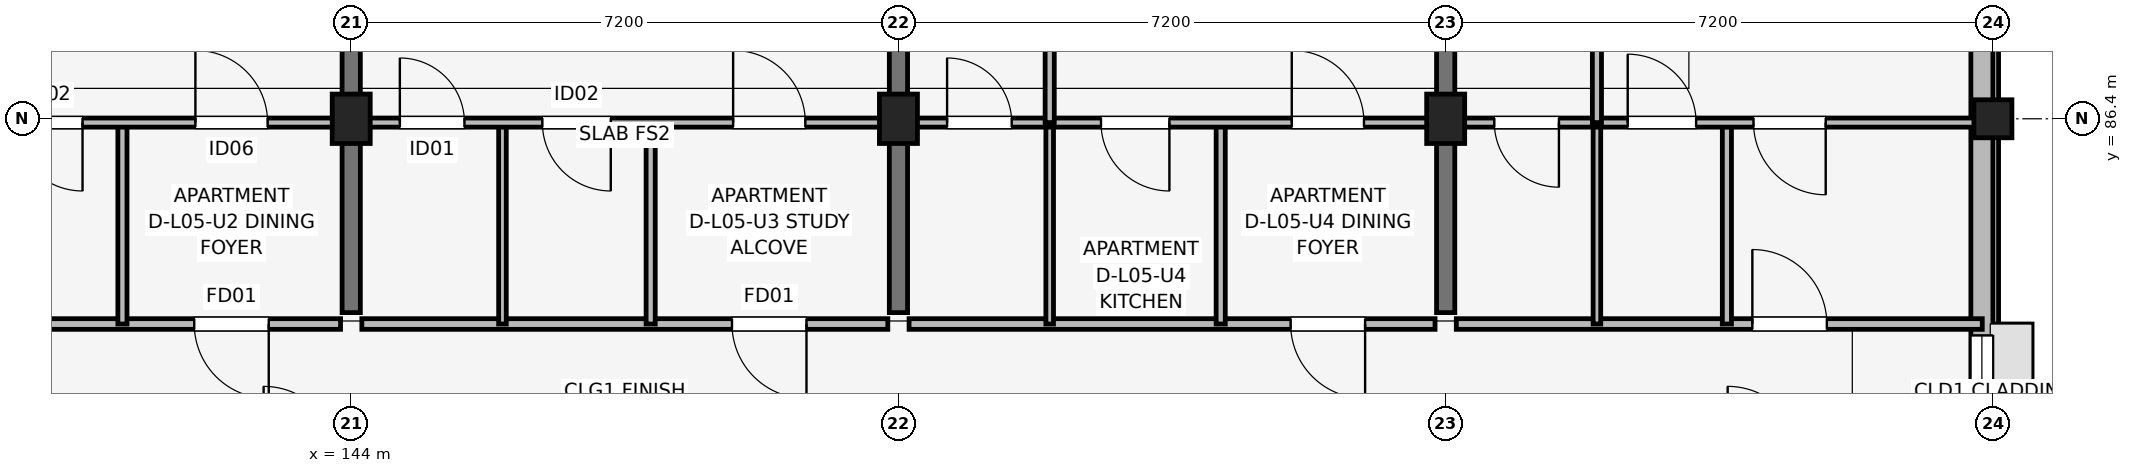
"""IFC4 building model, lengths in metres.
Left out: names, types, materials, properties, quantities, classifications, styles, units other than length and angle.
Written with IfcOpenShell. Run it as: python <this file> out.ifc"""

import sys

from ifc_helpers import new_model, si_unit, direction, frame, frame_2d, origin, origin_2d, place, context, subcontext, project, spatial, rectangle, extrude, element, fill, save


model = new_model("IFC4")
c1 = context("Model", 3, precision=1e-05, world=origin(), true_north=direction((0.0, 1.0)))
c2 = subcontext(c1, "Body", "Model", "MODEL_VIEW")
j1 = project(units=[si_unit("LENGTHUNIT", "METRE"), si_unit("PLANEANGLEUNIT", "RADIAN")], contexts=[c1])
p1 = place(None, origin())
s1 = spatial("IfcSite", under=j1, at=p1, CompositionType="ELEMENT")
p2 = place(p1, origin())
s2 = spatial("IfcBuilding", under=s1, at=p2, CompositionType="ELEMENT")
p3 = place(p2, frame((0.0, 0.0, 18.15)))
s3 = spatial("IfcBuildingStorey", under=s2, at=p3, CompositionType="ELEMENT", Elevation=18.15)
for number, where, z_axis, x_axis in (
    (1, (144.0, 86.4, 0.0), (0.0, 0.0, 1.0), (1.0, 0.0, 0.0)),
    (2, (151.2, 86.4, 0.0), (0.0, 0.0, 1.0), (1.0, 0.0, 0.0)),
    (3, (158.4, 86.4, 0.0), (0.0, 0.0, 1.0), (1.0, 0.0, 0.0)),
):
    element("IfcColumn", number, at=place(p3, frame(where, z_axis=z_axis, x_axis=x_axis)), inside=s3, PredefinedType="COLUMN", context=c2, shape_type="SweptSolid", body=[
        extrude(rectangle(XDim=0.5, YDim=0.65, at=origin_2d()), origin(), (0.0, 0.0, 1.0), 3.15),
    ])
p4 = place(p3, frame((165.6, 86.4, 0.0), z_axis=(0.0, 0.0, 1.0), x_axis=(1.0, 0.0, 0.0)))
e4 = element("IfcColumn", 4, at=p4, inside=s3, PredefinedType="COLUMN", context=c2, shape_type="SweptSolid", body=[
    extrude(rectangle(XDim=0.5, YDim=0.5, at=origin_2d()), origin(), (0.0, 0.0, 1.0), 3.15),
])
for number, where, z_axis, x_axis in (
    (5, (144.0, 83.85, 0.0), (0.0, 0.0, 1.0), (0.0, 1.0, 0.0)),
    (6, (151.2, 83.85, 0.0), (0.0, 0.0, 1.0), (0.0, 1.0, 0.0)),
    (7, (158.4, 83.85, 0.0), (0.0, 0.0, 1.0), (0.0, 1.0, 0.0)),
):
    element("IfcWall", number, at=place(p3, frame(where, z_axis=z_axis, x_axis=x_axis)), inside=s3, PredefinedType="SHEAR", context=c2, shape_type="SweptSolid", body=[
        extrude(rectangle(XDim=9.4, YDim=0.24, at=frame_2d((4.7, 0.0))), origin(), (0.0, 0.0, 1.0), 3.15),
    ])
p5 = place(p3, frame((165.455, 74.8, 0.0), z_axis=(0.0, 0.0, 1.0), x_axis=(0.0, 1.0, 0.0)))
e8 = element("IfcWall", 8, at=p5, inside=s3, PredefinedType="SOLIDWALL", context=c2, shape_type="SweptSolid", body=[
    extrude(rectangle(XDim=16.0, YDim=0.29, at=frame_2d((8.0, 0.0))), origin(), (0.0, 0.0, 1.0), 2.38),
])
p6 = place(p5, frame((7.25, 0.0, 1.05)))
e9 = element("IfcOpeningElement", 9, at=p6, cuts=e8, PredefinedType="OPENING", context=c2, shape_type="SweptSolid", body=[
    extrude(rectangle(XDim=1.5, YDim=1.15, at=frame_2d((0.75, 0.575))), frame((0.0, 0.155, 0.0), z_axis=(0.0, -1.0, 0.0), x_axis=(1.0, 0.0, 0.0)), (0.0, 0.0, 1.0), 0.31),
])
p7 = place(p5, frame((13.13, 0.0, 0.67)))
e10 = element("IfcOpeningElement", 10, at=p7, cuts=e8, PredefinedType="OPENING", context=c2, shape_type="SweptSolid", body=[
    extrude(rectangle(XDim=1.42, YDim=1.6, at=frame_2d((0.71, 0.8))), frame((0.0, 0.155, 0.0), z_axis=(0.0, -1.0, 0.0), x_axis=(1.0, 0.0, 0.0)), (0.0, 0.0, 1.0), 0.31),
])
p8 = place(p3, frame((136.94, 83.7, 0.0), z_axis=(0.0, 0.0, 1.0), x_axis=(1.0, 0.0, 0.0)))
e11 = element("IfcWall", 11, at=p8, inside=s3, PredefinedType="PARTITIONING", context=c2, shape_type="SweptSolid", body=[
    extrude(rectangle(XDim=6.92, YDim=0.14, at=frame_2d((3.46, 0.0))), origin(), (0.0, 0.0, 1.0), 2.38),
])
p9 = place(p8, frame((5.975, 0.0, 0.0), z_axis=(0.0, 0.0, 1.0), x_axis=(-1.0, 0.0, 0.0)))
e12 = element("IfcOpeningElement", 12, at=p9, cuts=e11, PredefinedType="OPENING", context=c2, shape_type="SweptSolid", body=[
    extrude(rectangle(XDim=0.98, YDim=2.1, at=frame_2d((0.49, 1.05))), frame((0.0, 0.08, 0.0), z_axis=(0.0, -1.0, 0.0), x_axis=(1.0, 0.0, 0.0)), (0.0, 0.0, 1.0), 0.16),
])
p10 = place(p3, frame((140.99, 83.7, 0.0), z_axis=(0.0, 0.0, 1.0), x_axis=(0.0, 1.0, 0.0)))
e13 = element("IfcWall", 13, at=p10, inside=s3, PredefinedType="PARTITIONING", context=c2, shape_type="SweptSolid", body=[
    extrude(rectangle(XDim=2.65, YDim=0.12, at=frame_2d((1.325, 0.0))), origin(), (0.0, 0.0, 1.0), 2.375),
])
p11 = place(p3, frame((136.94, 86.35, 0.0), z_axis=(0.0, 0.0, 1.0), x_axis=(1.0, 0.0, 0.0)))
e14 = element("IfcWall", 14, at=p11, inside=s3, PredefinedType="PARTITIONING", context=c2, shape_type="SweptSolid", body=[
    extrude(rectangle(XDim=6.92, YDim=0.12, at=frame_2d((3.46, 0.0))), origin(), (0.0, 0.0, 1.0), 2.375),
])
p12 = place(p11, frame((0.625, 0.0, 0.0)))
e15 = element("IfcOpeningElement", 15, at=p12, cuts=e14, PredefinedType="OPENING", context=c2, shape_type="SweptSolid", body=[
    extrude(rectangle(XDim=0.85, YDim=2.08, at=frame_2d((0.425, 1.04))), frame((0.0, 0.07, 0.0), z_axis=(0.0, -1.0, 0.0), x_axis=(1.0, 0.0, 0.0)), (0.0, 0.0, 1.0), 0.14),
])
p13 = place(p11, frame((3.525, 0.0, 0.0), z_axis=(0.0, 0.0, 1.0), x_axis=(-1.0, 0.0, 0.0)))
e16 = element("IfcOpeningElement", 16, at=p13, cuts=e14, PredefinedType="OPENING", context=c2, shape_type="SweptSolid", body=[
    extrude(rectangle(XDim=0.9, YDim=2.08, at=frame_2d((0.45, 1.04))), frame((0.0, 0.07, 0.0), z_axis=(0.0, -1.0, 0.0), x_axis=(1.0, 0.0, 0.0)), (0.0, 0.0, 1.0), 0.14),
])
p14 = place(p11, frame((5.01, 0.0, 0.0)))
e17 = element("IfcOpeningElement", 17, at=p14, cuts=e14, PredefinedType="OPENING", context=c2, shape_type="SweptSolid", body=[
    extrude(rectangle(XDim=0.95, YDim=2.08, at=frame_2d((0.475, 1.04))), frame((0.0, 0.07, 0.0), z_axis=(0.0, -1.0, 0.0), x_axis=(1.0, 0.0, 0.0)), (0.0, 0.0, 1.0), 0.14),
])
p15 = place(p3, frame((144.14, 83.7, 0.0), z_axis=(0.0, 0.0, 1.0), x_axis=(1.0, 0.0, 0.0)))
e18 = element("IfcWall", 18, at=p15, inside=s3, PredefinedType="PARTITIONING", context=c2, shape_type="SweptSolid", body=[
    extrude(rectangle(XDim=6.92, YDim=0.14, at=frame_2d((3.46, 0.0))), origin(), (0.0, 0.0, 1.0), 2.38),
])
p16 = place(p15, frame((5.85, 0.0, 0.0), z_axis=(0.0, 0.0, 1.0), x_axis=(-1.0, 0.0, 0.0)))
e19 = element("IfcOpeningElement", 19, at=p16, cuts=e18, PredefinedType="OPENING", context=c2, shape_type="SweptSolid", body=[
    extrude(rectangle(XDim=0.98, YDim=2.1, at=frame_2d((0.49, 1.05))), frame((0.0, 0.08, 0.0), z_axis=(0.0, -1.0, 0.0), x_axis=(1.0, 0.0, 0.0)), (0.0, 0.0, 1.0), 0.16),
])
p17 = place(p3, frame((145.99, 83.7, 0.0), z_axis=(0.0, 0.0, 1.0), x_axis=(0.0, 1.0, 0.0)))
e20 = element("IfcWall", 20, at=p17, inside=s3, PredefinedType="PARTITIONING", context=c2, shape_type="SweptSolid", body=[
    extrude(rectangle(XDim=2.65, YDim=0.1, at=frame_2d((1.325, 0.0))), origin(), (0.0, 0.0, 1.0), 2.375),
])
p18 = place(p3, frame((147.94, 83.7, 0.0), z_axis=(0.0, 0.0, 1.0), x_axis=(0.0, 1.0, 0.0)))
e21 = element("IfcWall", 21, at=p18, inside=s3, PredefinedType="PARTITIONING", context=c2, shape_type="SweptSolid", body=[
    extrude(rectangle(XDim=2.65, YDim=0.12, at=frame_2d((1.325, 0.0))), origin(), (0.0, 0.0, 1.0), 2.375),
])
p19 = place(p3, frame((144.14, 86.35, 0.0), z_axis=(0.0, 0.0, 1.0), x_axis=(1.0, 0.0, 0.0)))
e22 = element("IfcWall", 22, at=p19, inside=s3, PredefinedType="PARTITIONING", context=c2, shape_type="SweptSolid", body=[
    extrude(rectangle(XDim=6.92, YDim=0.12, at=frame_2d((3.46, 0.0))), origin(), (0.0, 0.0, 1.0), 2.375),
])
p20 = place(p19, frame((0.5, 0.0, 0.0)))
e23 = element("IfcOpeningElement", 23, at=p20, cuts=e22, PredefinedType="OPENING", context=c2, shape_type="SweptSolid", body=[
    extrude(rectangle(XDim=0.85, YDim=2.08, at=frame_2d((0.425, 1.04))), frame((0.0, 0.07, 0.0), z_axis=(0.0, -1.0, 0.0), x_axis=(1.0, 0.0, 0.0)), (0.0, 0.0, 1.0), 0.14),
])
p21 = place(p19, frame((3.275, 0.0, 0.0), z_axis=(0.0, 0.0, 1.0), x_axis=(-1.0, 0.0, 0.0)))
e24 = element("IfcOpeningElement", 24, at=p21, cuts=e22, PredefinedType="OPENING", context=c2, shape_type="SweptSolid", body=[
    extrude(rectangle(XDim=0.9, YDim=2.08, at=frame_2d((0.45, 1.04))), frame((0.0, 0.07, 0.0), z_axis=(0.0, -1.0, 0.0), x_axis=(1.0, 0.0, 0.0)), (0.0, 0.0, 1.0), 0.14),
])
p22 = place(p19, frame((4.885, 0.0, 0.0)))
e25 = element("IfcOpeningElement", 25, at=p22, cuts=e22, PredefinedType="OPENING", context=c2, shape_type="SweptSolid", body=[
    extrude(rectangle(XDim=0.95, YDim=2.08, at=frame_2d((0.475, 1.04))), frame((0.0, 0.07, 0.0), z_axis=(0.0, -1.0, 0.0), x_axis=(1.0, 0.0, 0.0)), (0.0, 0.0, 1.0), 0.14),
])
p23 = place(p3, frame((151.34, 83.7, 0.0), z_axis=(0.0, 0.0, 1.0), x_axis=(1.0, 0.0, 0.0)))
e26 = element("IfcWall", 26, at=p23, inside=s3, PredefinedType="PARTITIONING", context=c2, shape_type="SweptSolid", body=[
    extrude(rectangle(XDim=6.92, YDim=0.14, at=frame_2d((3.46, 0.0))), origin(), (0.0, 0.0, 1.0), 2.38),
])
p24 = place(p23, frame((6.0, 0.0, 0.0), z_axis=(0.0, 0.0, 1.0), x_axis=(-1.0, 0.0, 0.0)))
e27 = element("IfcOpeningElement", 27, at=p24, cuts=e26, PredefinedType="OPENING", context=c2, shape_type="SweptSolid", body=[
    extrude(rectangle(XDim=0.98, YDim=2.1, at=frame_2d((0.49, 1.05))), frame((0.0, 0.08, 0.0), z_axis=(0.0, -1.0, 0.0), x_axis=(1.0, 0.0, 0.0)), (0.0, 0.0, 1.0), 0.16),
])
p25 = place(p3, frame((153.19, 83.7, 0.0), z_axis=(0.0, 0.0, 1.0), x_axis=(0.0, 1.0, 0.0)))
e28 = element("IfcWall", 28, at=p25, inside=s3, PredefinedType="PARTITIONING", context=c2, shape_type="SweptSolid", body=[
    extrude(rectangle(XDim=2.65, YDim=0.1, at=frame_2d((1.325, 0.0))), origin(), (0.0, 0.0, 1.0), 2.375),
])
p26 = place(p3, frame((155.44, 83.7, 0.0), z_axis=(0.0, 0.0, 1.0), x_axis=(0.0, 1.0, 0.0)))
e29 = element("IfcWall", 29, at=p26, inside=s3, PredefinedType="PARTITIONING", context=c2, shape_type="SweptSolid", body=[
    extrude(rectangle(XDim=2.65, YDim=0.12, at=frame_2d((1.325, 0.0))), origin(), (0.0, 0.0, 1.0), 2.375),
])
p27 = place(p3, frame((151.34, 86.35, 0.0), z_axis=(0.0, 0.0, 1.0), x_axis=(1.0, 0.0, 0.0)))
e30 = element("IfcWall", 30, at=p27, inside=s3, PredefinedType="PARTITIONING", context=c2, shape_type="SweptSolid", body=[
    extrude(rectangle(XDim=6.92, YDim=0.12, at=frame_2d((3.46, 0.0))), origin(), (0.0, 0.0, 1.0), 2.375),
])
p28 = place(p27, frame((0.5, 0.0, 0.0)))
e31 = element("IfcOpeningElement", 31, at=p28, cuts=e30, PredefinedType="OPENING", context=c2, shape_type="SweptSolid", body=[
    extrude(rectangle(XDim=0.85, YDim=2.08, at=frame_2d((0.425, 1.04))), frame((0.0, 0.07, 0.0), z_axis=(0.0, -1.0, 0.0), x_axis=(1.0, 0.0, 0.0)), (0.0, 0.0, 1.0), 0.14),
])
p29 = place(p27, frame((3.425, 0.0, 0.0), z_axis=(0.0, 0.0, 1.0), x_axis=(-1.0, 0.0, 0.0)))
e32 = element("IfcOpeningElement", 32, at=p29, cuts=e30, PredefinedType="OPENING", context=c2, shape_type="SweptSolid", body=[
    extrude(rectangle(XDim=0.9, YDim=2.08, at=frame_2d((0.45, 1.04))), frame((0.0, 0.07, 0.0), z_axis=(0.0, -1.0, 0.0), x_axis=(1.0, 0.0, 0.0)), (0.0, 0.0, 1.0), 0.14),
])
p30 = place(p27, frame((5.035, 0.0, 0.0)))
e33 = element("IfcOpeningElement", 33, at=p30, cuts=e30, PredefinedType="OPENING", context=c2, shape_type="SweptSolid", body=[
    extrude(rectangle(XDim=0.95, YDim=2.08, at=frame_2d((0.475, 1.04))), frame((0.0, 0.07, 0.0), z_axis=(0.0, -1.0, 0.0), x_axis=(1.0, 0.0, 0.0)), (0.0, 0.0, 1.0), 0.14),
])
p31 = place(p3, frame((153.19, 86.35, 0.0), z_axis=(0.0, 0.0, 1.0), x_axis=(0.0, 1.0, 0.0)))
e34 = element("IfcWall", 34, at=p31, inside=s3, PredefinedType="PARTITIONING", context=c2, shape_type="SweptSolid", body=[
    extrude(rectangle(XDim=6.95, YDim=0.12, at=frame_2d((3.475, 0.0))), origin(), (0.0, 0.0, 1.0), 2.375),
])
p32 = place(p31, frame((3.925, 0.0, 0.0), z_axis=(0.0, 0.0, 1.0), x_axis=(-1.0, 0.0, 0.0)))
e35 = element("IfcOpeningElement", 35, at=p32, cuts=e34, PredefinedType="OPENING", context=c2, shape_type="SweptSolid", body=[
    extrude(rectangle(XDim=0.9, YDim=2.08, at=frame_2d((0.45, 1.04))), frame((0.0, 0.07, 0.0), z_axis=(0.0, -1.0, 0.0), x_axis=(1.0, 0.0, 0.0)), (0.0, 0.0, 1.0), 0.14),
])
p33 = place(p3, frame((158.54, 83.7, 0.0), z_axis=(0.0, 0.0, 1.0), x_axis=(1.0, 0.0, 0.0)))
e36 = element("IfcWall", 36, at=p33, inside=s3, PredefinedType="PARTITIONING", context=c2, shape_type="SweptSolid", body=[
    extrude(rectangle(XDim=6.92, YDim=0.14, at=frame_2d((3.46, 0.0))), origin(), (0.0, 0.0, 1.0), 2.38),
])
p34 = place(p33, frame((3.895, 0.0, 0.0)))
e37 = element("IfcOpeningElement", 37, at=p34, cuts=e36, PredefinedType="OPENING", context=c2, shape_type="SweptSolid", body=[
    extrude(rectangle(XDim=0.98, YDim=2.1, at=frame_2d((0.49, 1.05))), frame((0.0, 0.08, 0.0), z_axis=(0.0, -1.0, 0.0), x_axis=(1.0, 0.0, 0.0)), (0.0, 0.0, 1.0), 0.16),
])
p35 = place(p3, frame((160.39, 83.7, 0.0), z_axis=(0.0, 0.0, 1.0), x_axis=(0.0, 1.0, 0.0)))
e38 = element("IfcWall", 38, at=p35, inside=s3, PredefinedType="PARTITIONING", context=c2, shape_type="SweptSolid", body=[
    extrude(rectangle(XDim=2.65, YDim=0.1, at=frame_2d((1.325, 0.0))), origin(), (0.0, 0.0, 1.0), 2.375),
])
p36 = place(p3, frame((162.1, 83.7, 0.0), z_axis=(0.0, 0.0, 1.0), x_axis=(0.0, 1.0, 0.0)))
e39 = element("IfcWall", 39, at=p36, inside=s3, PredefinedType="PARTITIONING", context=c2, shape_type="SweptSolid", body=[
    extrude(rectangle(XDim=2.65, YDim=0.12, at=frame_2d((1.325, 0.0))), origin(), (0.0, 0.0, 1.0), 2.375),
])
p37 = place(p3, frame((158.54, 86.35, 0.0), z_axis=(0.0, 0.0, 1.0), x_axis=(1.0, 0.0, 0.0)))
e40 = element("IfcWall", 40, at=p37, inside=s3, PredefinedType="PARTITIONING", context=c2, shape_type="SweptSolid", body=[
    extrude(rectangle(XDim=6.92, YDim=0.12, at=frame_2d((3.46, 0.0))), origin(), (0.0, 0.0, 1.0), 2.375),
])
p38 = place(p37, frame((1.35, 0.0, 0.0), z_axis=(0.0, 0.0, 1.0), x_axis=(-1.0, 0.0, 0.0)))
e41 = element("IfcOpeningElement", 41, at=p38, cuts=e40, PredefinedType="OPENING", context=c2, shape_type="SweptSolid", body=[
    extrude(rectangle(XDim=0.85, YDim=2.08, at=frame_2d((0.425, 1.04))), frame((0.0, 0.07, 0.0), z_axis=(0.0, -1.0, 0.0), x_axis=(1.0, 0.0, 0.0)), (0.0, 0.0, 1.0), 0.14),
])
p39 = place(p37, frame((2.255, 0.0, 0.0)))
e42 = element("IfcOpeningElement", 42, at=p39, cuts=e40, PredefinedType="OPENING", context=c2, shape_type="SweptSolid", body=[
    extrude(rectangle(XDim=0.9, YDim=2.08, at=frame_2d((0.45, 1.04))), frame((0.0, 0.07, 0.0), z_axis=(0.0, -1.0, 0.0), x_axis=(1.0, 0.0, 0.0)), (0.0, 0.0, 1.0), 0.14),
])
p40 = place(p37, frame((4.86, 0.0, 0.0), z_axis=(0.0, 0.0, 1.0), x_axis=(-1.0, 0.0, 0.0)))
e43 = element("IfcOpeningElement", 43, at=p40, cuts=e40, PredefinedType="OPENING", context=c2, shape_type="SweptSolid", body=[
    extrude(rectangle(XDim=0.95, YDim=2.08, at=frame_2d((0.475, 1.04))), frame((0.0, 0.07, 0.0), z_axis=(0.0, -1.0, 0.0), x_axis=(1.0, 0.0, 0.0)), (0.0, 0.0, 1.0), 0.14),
])
p41 = place(p3, frame((160.39, 86.35, 0.0), z_axis=(0.0, 0.0, 1.0), x_axis=(0.0, 1.0, 0.0)))
e44 = element("IfcWall", 44, at=p41, inside=s3, PredefinedType="PARTITIONING", context=c2, shape_type="SweptSolid", body=[
    extrude(rectangle(XDim=6.95, YDim=0.12, at=frame_2d((3.475, 0.0))), origin(), (0.0, 0.0, 1.0), 2.375),
])
p42 = place(p41, frame((3.025, 0.0, 0.0)))
e45 = element("IfcOpeningElement", 45, at=p42, cuts=e44, PredefinedType="OPENING", context=c2, shape_type="SweptSolid", body=[
    extrude(rectangle(XDim=0.9, YDim=2.08, at=frame_2d((0.45, 1.04))), frame((0.0, 0.07, 0.0), z_axis=(0.0, -1.0, 0.0), x_axis=(1.0, 0.0, 0.0)), (0.0, 0.0, 1.0), 0.14),
])
p43 = place(p6, origin())
e46 = element("IfcWindow", 46, at=p43, inside=s3, PartitioningType="SINGLE_PANEL", PredefinedType="WINDOW", context=c2, shape_type="SweptSolid", body=[
    extrude(rectangle(XDim=1.5, YDim=1.15, at=frame_2d((0.75, 0.575))), frame((0.0, 0.03, 0.0), z_axis=(0.0, -1.0, 0.0), x_axis=(1.0, 0.0, 0.0)), (0.0, 0.0, 1.0), 0.06),
])
fill(e9, e46)
p44 = place(p9, origin())
e47 = element("IfcDoor", 47, at=p44, inside=s3, OperationType="SINGLE_SWING_RIGHT", PredefinedType="DOOR", context=c2, shape_type="SweptSolid", body=[
    extrude(rectangle(XDim=0.98, YDim=2.1, at=frame_2d((0.49, 1.05))), frame((0.0, 0.025, 0.0), z_axis=(0.0, -1.0, 0.0), x_axis=(1.0, 0.0, 0.0)), (0.0, 0.0, 1.0), 0.05),
])
fill(e12, e47)
p45 = place(p13, origin())
e48 = element("IfcDoor", 48, at=p45, inside=s3, OperationType="SINGLE_SWING_RIGHT", PredefinedType="DOOR", context=c2, shape_type="SweptSolid", body=[
    extrude(rectangle(XDim=0.9, YDim=2.08, at=frame_2d((0.45, 1.04))), frame((0.0, 0.025, 0.0), z_axis=(0.0, -1.0, 0.0), x_axis=(1.0, 0.0, 0.0)), (0.0, 0.0, 1.0), 0.05),
])
fill(e16, e48)
p46 = place(p14, origin())
e49 = element("IfcDoor", 49, at=p46, inside=s3, OperationType="SINGLE_SWING_LEFT", PredefinedType="DOOR", context=c2, shape_type="SweptSolid", body=[
    extrude(rectangle(XDim=0.95, YDim=2.08, at=frame_2d((0.475, 1.04))), frame((0.0, 0.025, 0.0), z_axis=(0.0, -1.0, 0.0), x_axis=(1.0, 0.0, 0.0)), (0.0, 0.0, 1.0), 0.05),
])
fill(e17, e49)
p47 = place(p16, origin())
e50 = element("IfcDoor", 50, at=p47, inside=s3, OperationType="SINGLE_SWING_RIGHT", PredefinedType="DOOR", context=c2, shape_type="SweptSolid", body=[
    extrude(rectangle(XDim=0.98, YDim=2.1, at=frame_2d((0.49, 1.05))), frame((0.0, 0.025, 0.0), z_axis=(0.0, -1.0, 0.0), x_axis=(1.0, 0.0, 0.0)), (0.0, 0.0, 1.0), 0.05),
])
fill(e19, e50)
p48 = place(p20, origin())
e51 = element("IfcDoor", 51, at=p48, inside=s3, OperationType="SINGLE_SWING_LEFT", PredefinedType="DOOR", context=c2, shape_type="SweptSolid", body=[
    extrude(rectangle(XDim=0.85, YDim=2.08, at=frame_2d((0.425, 1.04))), frame((0.0, 0.025, 0.0), z_axis=(0.0, -1.0, 0.0), x_axis=(1.0, 0.0, 0.0)), (0.0, 0.0, 1.0), 0.05),
])
fill(e23, e51)
p49 = place(p21, origin())
e52 = element("IfcDoor", 52, at=p49, inside=s3, OperationType="SINGLE_SWING_RIGHT", PredefinedType="DOOR", context=c2, shape_type="SweptSolid", body=[
    extrude(rectangle(XDim=0.9, YDim=2.08, at=frame_2d((0.45, 1.04))), frame((0.0, 0.025, 0.0), z_axis=(0.0, -1.0, 0.0), x_axis=(1.0, 0.0, 0.0)), (0.0, 0.0, 1.0), 0.05),
])
fill(e24, e52)
p50 = place(p22, origin())
e53 = element("IfcDoor", 53, at=p50, inside=s3, OperationType="SINGLE_SWING_LEFT", PredefinedType="DOOR", context=c2, shape_type="SweptSolid", body=[
    extrude(rectangle(XDim=0.95, YDim=2.08, at=frame_2d((0.475, 1.04))), frame((0.0, 0.025, 0.0), z_axis=(0.0, -1.0, 0.0), x_axis=(1.0, 0.0, 0.0)), (0.0, 0.0, 1.0), 0.05),
])
fill(e25, e53)
p51 = place(p24, origin())
e54 = element("IfcDoor", 54, at=p51, inside=s3, OperationType="SINGLE_SWING_RIGHT", PredefinedType="DOOR", context=c2, shape_type="SweptSolid", body=[
    extrude(rectangle(XDim=0.98, YDim=2.1, at=frame_2d((0.49, 1.05))), frame((0.0, 0.025, 0.0), z_axis=(0.0, -1.0, 0.0), x_axis=(1.0, 0.0, 0.0)), (0.0, 0.0, 1.0), 0.05),
])
fill(e27, e54)
p52 = place(p28, origin())
e55 = element("IfcDoor", 55, at=p52, inside=s3, OperationType="SINGLE_SWING_LEFT", PredefinedType="DOOR", context=c2, shape_type="SweptSolid", body=[
    extrude(rectangle(XDim=0.85, YDim=2.08, at=frame_2d((0.425, 1.04))), frame((0.0, 0.025, 0.0), z_axis=(0.0, -1.0, 0.0), x_axis=(1.0, 0.0, 0.0)), (0.0, 0.0, 1.0), 0.05),
])
fill(e31, e55)
p53 = place(p29, origin())
e56 = element("IfcDoor", 56, at=p53, inside=s3, OperationType="SINGLE_SWING_RIGHT", PredefinedType="DOOR", context=c2, shape_type="SweptSolid", body=[
    extrude(rectangle(XDim=0.9, YDim=2.08, at=frame_2d((0.45, 1.04))), frame((0.0, 0.025, 0.0), z_axis=(0.0, -1.0, 0.0), x_axis=(1.0, 0.0, 0.0)), (0.0, 0.0, 1.0), 0.05),
])
fill(e32, e56)
p54 = place(p30, origin())
e57 = element("IfcDoor", 57, at=p54, inside=s3, OperationType="SINGLE_SWING_LEFT", PredefinedType="DOOR", context=c2, shape_type="SweptSolid", body=[
    extrude(rectangle(XDim=0.95, YDim=2.08, at=frame_2d((0.475, 1.04))), frame((0.0, 0.025, 0.0), z_axis=(0.0, -1.0, 0.0), x_axis=(1.0, 0.0, 0.0)), (0.0, 0.0, 1.0), 0.05),
])
fill(e33, e57)
p55 = place(p34, origin())
e58 = element("IfcDoor", 58, at=p55, inside=s3, OperationType="SINGLE_SWING_LEFT", PredefinedType="DOOR", context=c2, shape_type="SweptSolid", body=[
    extrude(rectangle(XDim=0.98, YDim=2.1, at=frame_2d((0.49, 1.05))), frame((0.0, 0.025, 0.0), z_axis=(0.0, -1.0, 0.0), x_axis=(1.0, 0.0, 0.0)), (0.0, 0.0, 1.0), 0.05),
])
fill(e37, e58)
p56 = place(p38, origin())
e59 = element("IfcDoor", 59, at=p56, inside=s3, OperationType="SINGLE_SWING_RIGHT", PredefinedType="DOOR", context=c2, shape_type="SweptSolid", body=[
    extrude(rectangle(XDim=0.85, YDim=2.08, at=frame_2d((0.425, 1.04))), frame((0.0, 0.025, 0.0), z_axis=(0.0, -1.0, 0.0), x_axis=(1.0, 0.0, 0.0)), (0.0, 0.0, 1.0), 0.05),
])
fill(e41, e59)
p57 = place(p39, origin())
e60 = element("IfcDoor", 60, at=p57, inside=s3, OperationType="SINGLE_SWING_LEFT", PredefinedType="DOOR", context=c2, shape_type="SweptSolid", body=[
    extrude(rectangle(XDim=0.9, YDim=2.08, at=frame_2d((0.45, 1.04))), frame((0.0, 0.025, 0.0), z_axis=(0.0, -1.0, 0.0), x_axis=(1.0, 0.0, 0.0)), (0.0, 0.0, 1.0), 0.05),
])
fill(e42, e60)
p58 = place(p40, origin())
e61 = element("IfcDoor", 61, at=p58, inside=s3, OperationType="SINGLE_SWING_RIGHT", PredefinedType="DOOR", context=c2, shape_type="SweptSolid", body=[
    extrude(rectangle(XDim=0.95, YDim=2.08, at=frame_2d((0.475, 1.04))), frame((0.0, 0.025, 0.0), z_axis=(0.0, -1.0, 0.0), x_axis=(1.0, 0.0, 0.0)), (0.0, 0.0, 1.0), 0.05),
])
fill(e43, e61)
save(model, sys.argv[1])
